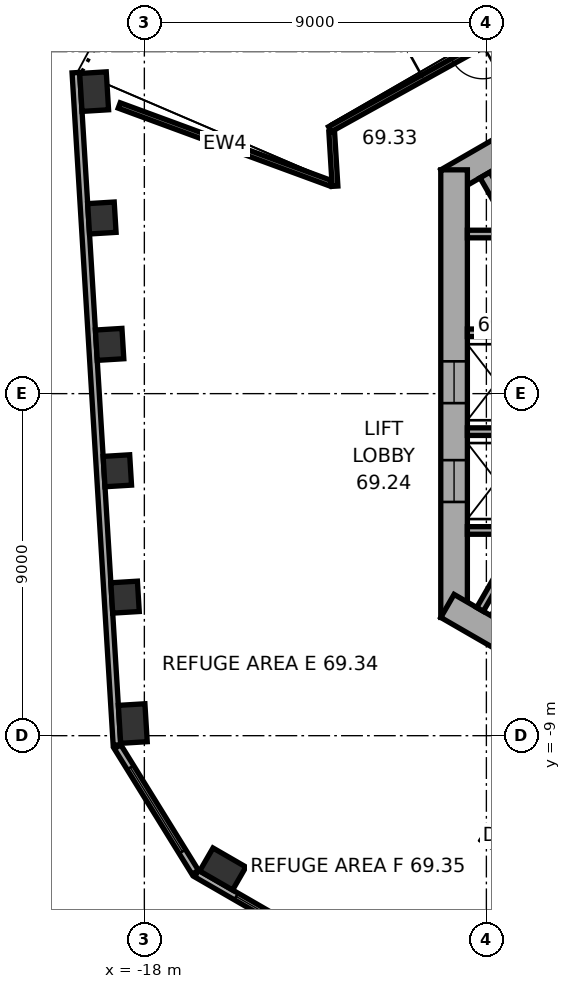
"""IFC4 building model, lengths in metres.
Left out: names, types, materials, properties, quantities, classifications, styles, units other than length and angle.
Written with IfcOpenShell. Run it as: python <this file> out.ifc"""

import sys

from ifc_helpers import new_model, si_unit, direction, frame, frame_2d, origin, origin_2d, place, context, subcontext, project, spatial, rectangle, extrude, element, fill, save


model = new_model("IFC4")
c1 = context("Model", 3, precision=1e-05, world=origin(), true_north=direction((0.0, 1.0)))
c2 = subcontext(c1, "Body", "Model", "MODEL_VIEW")
j1 = project(units=[si_unit("LENGTHUNIT", "METRE"), si_unit("PLANEANGLEUNIT", "RADIAN")], contexts=[c1])
p1 = place(None, origin())
s1 = spatial("IfcSite", under=j1, at=p1, CompositionType="ELEMENT")
p2 = place(p1, origin())
s2 = spatial("IfcBuilding", under=s1, at=p2, CompositionType="ELEMENT")
p3 = place(p2, frame((0.0, 0.0, 278.3)))
s3 = spatial("IfcBuildingStorey", under=s2, at=p3, CompositionType="ELEMENT", Elevation=278.3)
p4 = place(p3, frame((-19.321, 7.947, 0.0), z_axis=(0.0, 0.0, 1.0), x_axis=(0.061048539535, -0.998134798422, 0.0)))
e1 = element("IfcColumn", 1, at=p4, inside=s3, PredefinedType="COLUMN", context=c2, shape_type="SweptSolid", body=[
    extrude(rectangle(XDim=1.0, YDim=0.7, at=origin_2d()), origin(), (0.0, 0.0, 1.0), 7.4),
])
for number, where, z_axis, x_axis in (
    (2, (-19.118, 4.621, 0.0), (0.0, 0.0, 1.0), (0.061, -0.998, 0.0)),
    (3, (-18.914, 1.296, 0.0), (0.0, 0.0, 1.0), (0.061, -0.998, 0.0)),
    (4, (-18.711, -2.03, 0.0), (0.0, 0.0, 1.0), (0.061, -0.998, 0.0)),
    (5, (-18.508, -5.355, 0.0), (0.0, 0.0, 1.0), (0.061, -0.998, 0.0)),
):
    element("IfcColumn", number, at=place(p3, frame(where, z_axis=z_axis, x_axis=x_axis)), inside=s3, PredefinedType="COLUMN", context=c2, shape_type="SweptSolid", body=[
        extrude(rectangle(XDim=0.8, YDim=0.7, at=origin_2d()), origin(), (0.0, 0.0, 1.0), 7.4),
    ])
for number, where, z_axis, x_axis in (
    (6, (-18.304, -8.68, 0.0), (0.0, 0.0, 1.0), (0.061, -0.998, 0.0)),
    (7, (-15.936, -12.508, 0.0), (0.0, 0.0, 1.0), (0.866, -0.5, 0.0)),
):
    element("IfcColumn", number, at=place(p3, frame(where, z_axis=z_axis, x_axis=x_axis)), inside=s3, PredefinedType="COLUMN", context=c2, shape_type="SweptSolid", body=[
        extrude(rectangle(XDim=1.0, YDim=0.7, at=origin_2d()), origin(), (0.0, 0.0, 1.0), 7.4),
    ])
p5 = place(p3, frame((0.175, 11.475, 0.0), z_axis=(0.0, 0.0, 1.0), x_axis=(-0.866026453023, -0.499998182661, 0.0)))
e8 = element("IfcWall", 8, at=p5, inside=s3, PredefinedType="SHEAR", context=c2, shape_type="SweptSolid", body=[
    extrude(rectangle(XDim=11.778, YDim=0.7, at=frame_2d((5.889, 0.0))), origin(), (0.0, 0.0, 1.0), 7.4),
])
p6 = place(p5, frame((6.089, 0.0, 0.0)))
e9 = element("IfcOpeningElement", 9, at=p6, cuts=e8, PredefinedType="OPENING", context=c2, shape_type="SweptSolid", body=[
    extrude(rectangle(XDim=1.5, YDim=2.1, at=frame_2d((0.75, 1.05))), frame((0.0, 0.36, 0.0), z_axis=(0.0, -1.0, 0.0), x_axis=(1.0, 0.0, 0.0)), (0.0, 0.0, 1.0), 0.72),
])
p7 = place(p5, frame((1.639, 0.0, 0.0)))
e10 = element("IfcOpeningElement", 10, at=p7, cuts=e8, PredefinedType="OPENING", context=c2, shape_type="SweptSolid", body=[
    extrude(rectangle(XDim=0.9, YDim=2.1, at=frame_2d((0.45, 1.05))), frame((0.0, 0.36, 0.0), z_axis=(0.0, -1.0, 0.0), x_axis=(1.0, 0.0, 0.0)), (0.0, 0.0, 1.0), 0.72),
])
p8 = place(p5, frame((4.239, 0.0, 0.0)))
e11 = element("IfcOpeningElement", 11, at=p8, cuts=e8, PredefinedType="OPENING", context=c2, shape_type="SweptSolid", body=[
    extrude(rectangle(XDim=0.9, YDim=2.1, at=frame_2d((0.45, 1.05))), frame((0.0, 0.36, 0.0), z_axis=(0.0, -1.0, 0.0), x_axis=(1.0, 0.0, 0.0)), (0.0, 0.0, 1.0), 0.72),
])
p9 = place(p3, frame((-9.85, 5.889, 0.0), z_axis=(0.0, 0.0, 1.0), x_axis=(0.0, -1.0, 0.0)))
e12 = element("IfcWall", 12, at=p9, inside=s3, PredefinedType="SHEAR", context=c2, shape_type="SweptSolid", body=[
    extrude(rectangle(XDim=11.778, YDim=0.7, at=frame_2d((5.889, 0.0))), origin(), (0.0, 0.0, 1.0), 7.4),
])
p10 = place(p9, frame((5.039, 0.0, 0.0)))
e13 = element("IfcOpeningElement", 13, at=p10, cuts=e12, PredefinedType="OPENING", context=c2, shape_type="SweptSolid", body=[
    extrude(rectangle(XDim=1.1, YDim=2.1, at=frame_2d((0.55, 1.05))), frame((0.0, 0.36, 0.0), z_axis=(0.0, -1.0, 0.0), x_axis=(1.0, 0.0, 0.0)), (0.0, 0.0, 1.0), 0.72),
])
p11 = place(p9, frame((7.639, 0.0, 0.0)))
e14 = element("IfcOpeningElement", 14, at=p11, cuts=e12, PredefinedType="OPENING", context=c2, shape_type="SweptSolid", body=[
    extrude(rectangle(XDim=1.1, YDim=2.1, at=frame_2d((0.55, 1.05))), frame((0.0, 0.36, 0.0), z_axis=(0.0, -1.0, 0.0), x_axis=(1.0, 0.0, 0.0)), (0.0, 0.0, 1.0), 0.72),
])
p12 = place(p3, frame((-10.025, -5.586, 0.0), z_axis=(0.0, 0.0, 1.0), x_axis=(0.866026453023, -0.499998182661, 0.0)))
e15 = element("IfcWall", 15, at=p12, inside=s3, PredefinedType="SHEAR", context=c2, shape_type="SweptSolid", body=[
    extrude(rectangle(XDim=11.778, YDim=0.7, at=frame_2d((5.889, 0.0))), origin(), (0.0, 0.0, 1.0), 7.4),
])
p13 = place(p12, frame((6.089, 0.0, 0.0)))
e16 = element("IfcOpeningElement", 16, at=p13, cuts=e15, PredefinedType="OPENING", context=c2, shape_type="SweptSolid", body=[
    extrude(rectangle(XDim=1.5, YDim=2.1, at=frame_2d((0.75, 1.05))), frame((0.0, 0.36, 0.0), z_axis=(0.0, -1.0, 0.0), x_axis=(1.0, 0.0, 0.0)), (0.0, 0.0, 1.0), 0.72),
])
p14 = place(p12, frame((1.539, 0.0, 0.0)))
e17 = element("IfcOpeningElement", 17, at=p14, cuts=e15, PredefinedType="OPENING", context=c2, shape_type="SweptSolid", body=[
    extrude(rectangle(XDim=1.1, YDim=2.1, at=frame_2d((0.55, 1.05))), frame((0.0, 0.36, 0.0), z_axis=(0.0, -1.0, 0.0), x_axis=(1.0, 0.0, 0.0)), (0.0, 0.0, 1.0), 0.72),
])
p15 = place(p12, frame((4.139, 0.0, 0.0)))
e18 = element("IfcOpeningElement", 18, at=p15, cuts=e15, PredefinedType="OPENING", context=c2, shape_type="SweptSolid", body=[
    extrude(rectangle(XDim=1.1, YDim=2.1, at=frame_2d((0.55, 1.05))), frame((0.0, 0.36, 0.0), z_axis=(0.0, -1.0, 0.0), x_axis=(1.0, 0.0, 0.0)), (0.0, 0.0, 1.0), 0.72),
])
p16 = place(p3, frame((-19.802, 8.446, 0.0), z_axis=(0.0, 0.0, 1.0), x_axis=(0.061036964236, -0.99813550633, 0.0)))
e19 = element("IfcWall", 19, at=p16, inside=s3, PredefinedType="STANDARD", context=c2, shape_type="SweptSolid", body=[
    extrude(rectangle(XDim=17.723, YDim=0.2, at=frame_2d((8.862, 0.0))), origin(), (0.0, 0.0, 1.0), 7.4),
])
p17 = place(p3, frame((-18.706, -9.291, 0.0), z_axis=(0.0, 0.0, 1.0), x_axis=(0.526209683648, -0.850354848775, 0.0)))
e20 = element("IfcWall", 20, at=p17, inside=s3, PredefinedType="STANDARD", context=c2, shape_type="SweptSolid", body=[
    extrude(rectangle(XDim=3.886, YDim=0.2, at=frame_2d((1.943, 0.0))), origin(), (0.0, 0.0, 1.0), 7.4),
])
p18 = place(p17, frame((0.643, 0.0, 0.8)))
e21 = element("IfcOpeningElement", 21, at=p18, cuts=e20, PredefinedType="OPENING", context=c2, shape_type="SweptSolid", body=[
    extrude(rectangle(XDim=2.6, YDim=4.2, at=frame_2d((1.3, 2.1))), frame((0.0, 0.11, 0.0), z_axis=(0.0, -1.0, 0.0), x_axis=(1.0, 0.0, 0.0)), (0.0, 0.0, 1.0), 0.22),
])
p19 = place(p3, frame((-16.626, -12.629, 0.0), z_axis=(0.0, 0.0, 1.0), x_axis=(0.866026460444, -0.499998169808, 0.0)))
e22 = element("IfcWall", 22, at=p19, inside=s3, PredefinedType="STANDARD", context=c2, shape_type="SweptSolid", body=[
    extrude(rectangle(XDim=17.731, YDim=0.2, at=frame_2d((8.866, 0.0))), origin(), (0.0, 0.0, 1.0), 7.4),
])
p20 = place(p19, frame((1.203, 0.0, 0.8)))
e23 = element("IfcOpeningElement", 23, at=p20, cuts=e22, PredefinedType="OPENING", context=c2, shape_type="SweptSolid", body=[
    extrude(rectangle(XDim=2.0, YDim=4.2, at=frame_2d((1.0, 2.1))), frame((0.0, 0.11, 0.0), z_axis=(0.0, -1.0, 0.0), x_axis=(1.0, 0.0, 0.0)), (0.0, 0.0, 1.0), 0.22),
])
p21 = place(p19, frame((4.535, 0.0, 0.8)))
e24 = element("IfcOpeningElement", 24, at=p21, cuts=e22, PredefinedType="OPENING", context=c2, shape_type="SweptSolid", body=[
    extrude(rectangle(XDim=2.0, YDim=4.2, at=frame_2d((1.0, 2.1))), frame((0.0, 0.11, 0.0), z_axis=(0.0, -1.0, 0.0), x_axis=(1.0, 0.0, 0.0)), (0.0, 0.0, 1.0), 0.22),
])
p22 = place(p19, frame((7.867, 0.0, 0.8)))
e25 = element("IfcOpeningElement", 25, at=p22, cuts=e22, PredefinedType="OPENING", context=c2, shape_type="SweptSolid", body=[
    extrude(rectangle(XDim=2.0, YDim=4.2, at=frame_2d((1.0, 2.1))), frame((0.0, 0.11, 0.0), z_axis=(0.0, -1.0, 0.0), x_axis=(1.0, 0.0, 0.0)), (0.0, 0.0, 1.0), 0.22),
])
p23 = place(p19, frame((11.198, 0.0, 0.8)))
e26 = element("IfcOpeningElement", 26, at=p23, cuts=e22, PredefinedType="OPENING", context=c2, shape_type="SweptSolid", body=[
    extrude(rectangle(XDim=2.0, YDim=4.2, at=frame_2d((1.0, 2.1))), frame((0.0, 0.11, 0.0), z_axis=(0.0, -1.0, 0.0), x_axis=(1.0, 0.0, 0.0)), (0.0, 0.0, 1.0), 0.22),
])
p24 = place(p19, frame((14.53, 0.0, 0.8)))
e27 = element("IfcOpeningElement", 27, at=p24, cuts=e22, PredefinedType="OPENING", context=c2, shape_type="SweptSolid", body=[
    extrude(rectangle(XDim=2.0, YDim=4.2, at=frame_2d((1.0, 2.1))), frame((0.0, 0.11, 0.0), z_axis=(0.0, -1.0, 0.0), x_axis=(1.0, 0.0, 0.0)), (0.0, 0.0, 1.0), 0.22),
])
p25 = place(p3, frame((-18.662, 7.582, 0.0), z_axis=(0.0, 0.0, 1.0), x_axis=(0.938501865144, -0.345274165152, 0.0)))
e28 = element("IfcWall", 28, at=p25, inside=s3, PredefinedType="STANDARD", context=c2, shape_type="SweptSolid", body=[
    extrude(rectangle(XDim=5.93, YDim=0.15, at=frame_2d((2.965, 0.0))), origin(), (0.0, 0.0, 1.0), 2.6),
])
p26 = place(p3, frame((-12.982, 5.458, 0.0), z_axis=(0.0, 0.0, 1.0), x_axis=(-0.06115150754, 0.998128495298, 0.0)))
e29 = element("IfcWall", 29, at=p26, inside=s3, PredefinedType="STANDARD", context=c2, shape_type="SweptSolid", body=[
    extrude(rectangle(XDim=1.437, YDim=0.15, at=frame_2d((0.719, 0.0))), origin(), (0.0, 0.0, 1.0), 2.6),
])
p27 = place(p3, frame((-13.117, 6.958, 0.0), z_axis=(0.0, 0.0, 1.0), x_axis=(0.874660896688, 0.484735304889, 0.0)))
e30 = element("IfcWall", 30, at=p27, inside=s3, PredefinedType="STANDARD", context=c2, shape_type="SweptSolid", body=[
    extrude(rectangle(XDim=14.781, YDim=0.15, at=frame_2d((7.39, 0.0))), origin(), (0.0, 0.0, 1.0), 2.6),
])
p28 = place(p27, frame((2.795, 0.0, 0.0)))
e31 = element("IfcOpeningElement", 31, at=p28, cuts=e30, PredefinedType="OPENING", context=c2, shape_type="SweptSolid", body=[
    extrude(rectangle(XDim=1.8, YDim=2.4, at=frame_2d((0.9, 1.2))), frame((0.0, 0.085, 0.0), z_axis=(0.0, -1.0, 0.0), x_axis=(1.0, 0.0, 0.0)), (0.0, 0.0, 1.0), 0.17),
])
p29 = place(p27, frame((10.186, 0.0, 0.0)))
e32 = element("IfcOpeningElement", 32, at=p29, cuts=e30, PredefinedType="OPENING", context=c2, shape_type="SweptSolid", body=[
    extrude(rectangle(XDim=1.8, YDim=2.4, at=frame_2d((0.9, 1.2))), frame((0.0, 0.085, 0.0), z_axis=(0.0, -1.0, 0.0), x_axis=(1.0, 0.0, 0.0)), (0.0, 0.0, 1.0), 0.17),
])
for number, where, z_axis, x_axis in (
    (33, (-7.3, 4.2, 0.0), (0.0, 0.0, 1.0), (-1.0, 0.0, 0.0)),
    (34, (-7.3, 1.6, 0.0), (0.0, 0.0, 1.0), (-1.0, 0.0, 0.0)),
    (35, (-7.3, -1.0, 0.0), (0.0, 0.0, 1.0), (-1.0, 0.0, 0.0)),
    (36, (-7.3, -3.6, 0.0), (0.0, 0.0, 1.0), (-1.0, 0.0, 0.0)),
    (37, (-8.067, -3.772, 0.0), (0.0, 0.0, 1.0), (-0.5, -0.866, 0.0)),
):
    element("IfcWall", number, at=place(p3, frame(where, z_axis=z_axis, x_axis=x_axis)), inside=s3, PredefinedType="PARTITIONING", context=c2, shape_type="SweptSolid", body=[
        extrude(rectangle(XDim=2.2, YDim=0.2, at=frame_2d((1.1, 0.0))), origin(), (0.0, 0.0, 1.0), 7.12),
    ])
p30 = place(p3, frame((-7.937, 3.847, 0.0), z_axis=(0.0, 0.0, 1.0), x_axis=(-0.50002983664, 0.866008176907, 0.0)))
e38 = element("IfcWall", 38, at=p30, inside=s3, PredefinedType="SHEAR", context=c2, shape_type="SweptSolid", body=[
    extrude(rectangle(XDim=2.2, YDim=0.3, at=frame_2d((1.1, 0.0))), origin(), (0.0, 0.0, 1.0), 7.12),
])
p31 = place(p3, frame((-9.976, -15.545, 0.0), z_axis=(0.0, 0.0, 1.0), x_axis=(0.540123567873, 0.841585724349, 0.0)))
e39 = element("IfcWall", 39, at=p31, inside=s3, PredefinedType="PARTITIONING", context=c2, shape_type="SweptSolid", body=[
    extrude(rectangle(XDim=5.256, YDim=0.15, at=frame_2d((2.628, 0.0))), origin(), (0.0, 0.0, 1.0), 6.57),
])
p32 = place(p31, frame((3.606, 0.0, 0.0)))
e40 = element("IfcOpeningElement", 40, at=p32, cuts=e39, PredefinedType="OPENING", context=c2, shape_type="SweptSolid", body=[
    extrude(rectangle(XDim=1.4, YDim=2.4, at=frame_2d((0.7, 1.2))), frame((0.0, 0.085, 0.0), z_axis=(0.0, -1.0, 0.0), x_axis=(1.0, 0.0, 0.0)), (0.0, 0.0, 1.0), 0.17),
])
p33 = place(p18, origin())
e41 = element("IfcWindow", 41, at=p33, inside=s3, PartitioningType="SINGLE_PANEL", PredefinedType="WINDOW", context=c2, shape_type="SweptSolid", body=[
    extrude(rectangle(XDim=2.6, YDim=4.2, at=frame_2d((1.3, 2.1))), frame((0.0, 0.03, 0.0), z_axis=(0.0, -1.0, 0.0), x_axis=(1.0, 0.0, 0.0)), (0.0, 0.0, 1.0), 0.06),
])
fill(e21, e41)
p34 = place(p20, origin())
e42 = element("IfcWindow", 42, at=p34, inside=s3, PartitioningType="SINGLE_PANEL", PredefinedType="WINDOW", context=c2, shape_type="SweptSolid", body=[
    extrude(rectangle(XDim=2.0, YDim=4.2, at=frame_2d((1.0, 2.1))), frame((0.0, 0.03, 0.0), z_axis=(0.0, -1.0, 0.0), x_axis=(1.0, 0.0, 0.0)), (0.0, 0.0, 1.0), 0.06),
])
fill(e23, e42)
p35 = place(p28, origin())
e43 = element("IfcDoor", 43, at=p35, inside=s3, OperationType="DOUBLE_DOOR_DOUBLE_SWING", PredefinedType="DOOR", context=c2, shape_type="SweptSolid", body=[
    extrude(rectangle(XDim=1.8, YDim=2.4, at=frame_2d((0.9, 1.2))), frame((0.0, 0.025, 0.0), z_axis=(0.0, -1.0, 0.0), x_axis=(1.0, 0.0, 0.0)), (0.0, 0.0, 1.0), 0.05),
])
fill(e31, e43)
p36 = place(p10, origin())
e44 = element("IfcDoor", 44, at=p36, inside=s3, OperationType="DOUBLE_DOOR_SLIDING", PredefinedType="DOOR", context=c2, shape_type="SweptSolid", body=[
    extrude(rectangle(XDim=1.1, YDim=2.1, at=frame_2d((0.55, 1.05))), frame((0.0, 0.025, 0.0), z_axis=(0.0, -1.0, 0.0), x_axis=(1.0, 0.0, 0.0)), (0.0, 0.0, 1.0), 0.05),
])
fill(e13, e44)
p37 = place(p11, origin())
e45 = element("IfcDoor", 45, at=p37, inside=s3, OperationType="DOUBLE_DOOR_SLIDING", PredefinedType="DOOR", context=c2, shape_type="SweptSolid", body=[
    extrude(rectangle(XDim=1.1, YDim=2.1, at=frame_2d((0.55, 1.05))), frame((0.0, 0.025, 0.0), z_axis=(0.0, -1.0, 0.0), x_axis=(1.0, 0.0, 0.0)), (0.0, 0.0, 1.0), 0.05),
])
fill(e14, e45)
save(model, sys.argv[1])
